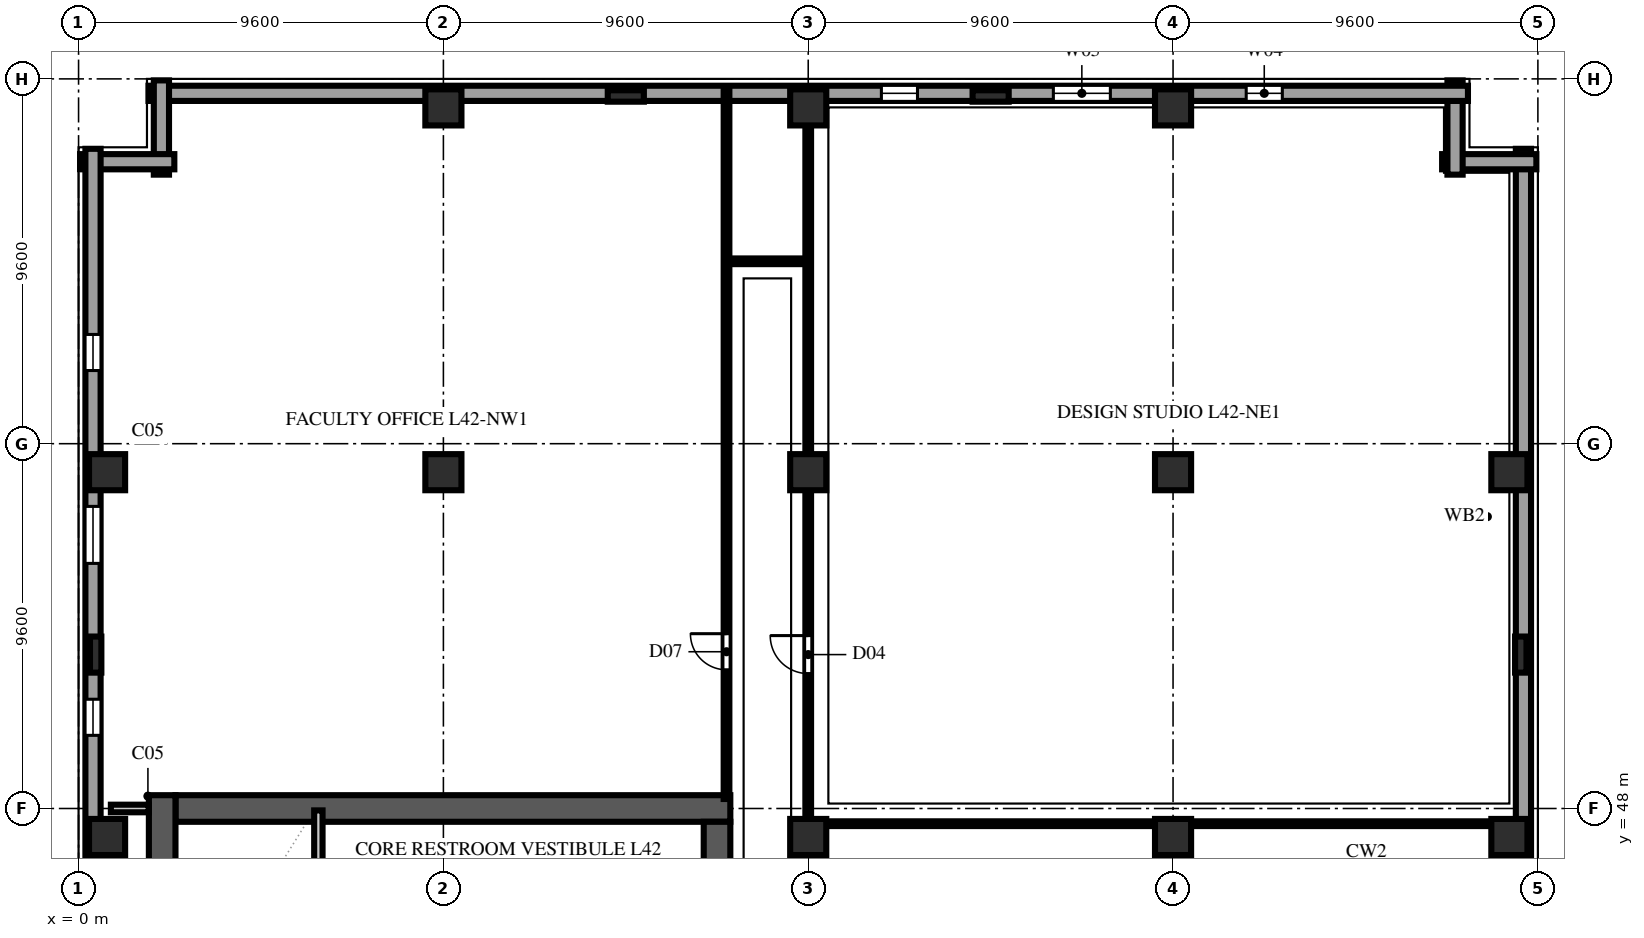
"""IFC4 building model, lengths in metres.
Left out: names, types, materials, properties, quantities, classifications, styles, units other than length and angle.
Written with IfcOpenShell. Run it as: python <this file> out.ifc"""

import sys

from ifc_helpers import new_model, si_unit, direction, frame, frame_2d, origin, origin_2d, place, context, subcontext, project, spatial, rectangle, extrude, element, fill, save


model = new_model("IFC4")
c1 = context("Model", 3, precision=1e-05, world=origin(), true_north=direction((0.0, 1.0)))
c2 = subcontext(c1, "Body", "Model", "MODEL_VIEW")
j1 = project(units=[si_unit("LENGTHUNIT", "METRE"), si_unit("PLANEANGLEUNIT", "RADIAN")], contexts=[c1])
p1 = place(None, origin())
s1 = spatial("IfcSite", under=j1, at=p1, CompositionType="ELEMENT")
p2 = place(p1, origin())
s2 = spatial("IfcBuilding", under=s1, at=p2, CompositionType="ELEMENT")
p3 = place(p2, frame((0.0, 0.0, 167.4)))
s3 = spatial("IfcBuildingStorey", under=s2, at=p3, CompositionType="ELEMENT", Elevation=167.4)
p4 = place(p3, frame((2.55, 48.0, 0.0), z_axis=(0.0, 0.0, 1.0), x_axis=(1.0, 0.0, 0.0)))
e1 = element("IfcWall", 1, at=p4, inside=s3, PredefinedType="SHEAR", context=c2, shape_type="SweptSolid", body=[
    extrude(rectangle(XDim=14.6, YDim=0.7, at=frame_2d((7.3, 0.0))), origin(), (0.0, 0.0, 1.0), 3.54),
])
p5 = place(p3, frame((2.2, 9.25, 0.0), z_axis=(0.0, 0.0, 1.0), x_axis=(0.0, 1.0, 0.0)))
e2 = element("IfcWall", 2, at=p5, inside=s3, PredefinedType="SHEAR", context=c2, shape_type="SweptSolid", body=[
    extrude(rectangle(XDim=39.1, YDim=0.7, at=frame_2d((19.55, 0.0))), origin(), (0.0, 0.0, 1.0), 3.54),
])
p6 = place(p3, frame((16.8, 36.4, 0.0), z_axis=(0.0, 0.0, 1.0), x_axis=(0.0, 1.0, 0.0)))
e3 = element("IfcWall", 3, at=p6, inside=s3, PredefinedType="SHEAR", context=c2, shape_type="SweptSolid", body=[
    extrude(rectangle(XDim=11.25, YDim=0.7, at=frame_2d((5.625, 0.0))), origin(), (0.0, 0.0, 1.0), 3.54),
])
p7 = place(p6, frame((9.2, 0.0, 0.0)))
e4 = element("IfcOpeningElement", 4, at=p7, cuts=e3, PredefinedType="OPENING", context=c2, shape_type="SweptSolid", body=[
    extrude(rectangle(XDim=0.95, YDim=2.15, at=frame_2d((0.475, 1.075))), frame((0.0, 0.362, 0.0), z_axis=(0.0, -1.0, 0.0), x_axis=(1.0, 0.0, 0.0)), (0.0, 0.0, 1.0), 0.724),
])
for number, where, z_axis, x_axis in (
    (5, (0.75, 47.25, 0.0), (0.0, 0.0, 1.0), (1.0, 0.0, 0.0)),
    (6, (0.75, 56.85, 0.0), (0.0, 0.0, 1.0), (1.0, 0.0, 0.0)),
    (7, (9.6, 56.85, 0.0), (0.0, 0.0, 1.0), (1.0, 0.0, 0.0)),
    (8, (9.6, 66.45, 0.0), (0.0, 0.0, 1.0), (1.0, 0.0, 0.0)),
    (9, (19.2, 47.25, 0.0), (0.0, 0.0, 1.0), (1.0, 0.0, 0.0)),
    (10, (19.2, 56.85, 0.0), (0.0, 0.0, 1.0), (1.0, 0.0, 0.0)),
    (11, (19.2, 66.45, 0.0), (0.0, 0.0, 1.0), (1.0, 0.0, 0.0)),
    (12, (28.8, 47.25, 0.0), (0.0, 0.0, 1.0), (1.0, 0.0, 0.0)),
    (13, (28.8, 56.85, 0.0), (0.0, 0.0, 1.0), (1.0, 0.0, 0.0)),
    (14, (28.8, 66.45, 0.0), (0.0, 0.0, 1.0), (1.0, 0.0, 0.0)),
    (15, (37.65, 47.25, 0.0), (0.0, 0.0, 1.0), (1.0, 0.0, 0.0)),
    (16, (37.65, 56.85, 0.0), (0.0, 0.0, 1.0), (1.0, 0.0, 0.0)),
):
    element("IfcColumn", number, at=place(p3, frame(where, z_axis=z_axis, x_axis=x_axis)), inside=s3, PredefinedType="COLUMN", context=c2, shape_type="SweptSolid", body=[
        extrude(rectangle(XDim=0.95, YDim=0.95, at=origin_2d()), origin(), (0.0, 0.0, 1.0), 3.8),
    ])
for number, where, z_axis, x_axis in (
    (17, (0.45, 52.05, 0.0), (0.0, 0.0, 1.0), (0.0, 1.0, 0.0)),
    (18, (14.4, 66.75, 0.0), (0.0, 0.0, 1.0), (1.0, 0.0, 0.0)),
    (19, (24.0, 66.75, 0.0), (0.0, 0.0, 1.0), (1.0, 0.0, 0.0)),
    (20, (37.95, 52.05, 0.0), (0.0, 0.0, 1.0), (0.0, 1.0, 0.0)),
):
    element("IfcColumn", number, at=place(p3, frame(where, z_axis=z_axis, x_axis=x_axis)), inside=s3, PredefinedType="PILASTER", context=c2, shape_type="SweptSolid", body=[
        extrude(rectangle(XDim=0.95, YDim=0.3, at=origin_2d()), origin(), (0.0, 0.0, 1.0), 3.8),
    ])
p8 = place(p3, frame((38.02, 46.0, 0.0), z_axis=(0.0, 0.0, 1.0), x_axis=(0.0, 1.0, 0.0)))
e21 = element("IfcWall", 21, at=p8, inside=s3, PredefinedType="SOLIDWALL", context=c2, shape_type="SweptSolid", body=[
    extrude(rectangle(XDim=19.36, YDim=0.4, at=frame_2d((9.68, 0.0))), origin(), (0.0, 0.0, 1.0), 3.54),
])
p9 = place(p3, frame((38.36, 65.02, 0.0), z_axis=(0.0, 0.0, 1.0), x_axis=(-1.0, 0.0, 0.0)))
e22 = element("IfcWall", 22, at=p9, inside=s3, PredefinedType="SOLIDWALL", context=c2, shape_type="SweptSolid", body=[
    extrude(rectangle(XDim=2.48, YDim=0.4, at=frame_2d((1.24, 0.0))), origin(), (0.0, 0.0, 1.0), 3.54),
])
p10 = place(p3, frame((36.22, 64.68, 0.0), z_axis=(0.0, 0.0, 1.0), x_axis=(0.0, 1.0, 0.0)))
e23 = element("IfcWall", 23, at=p10, inside=s3, PredefinedType="SOLIDWALL", context=c2, shape_type="SweptSolid", body=[
    extrude(rectangle(XDim=2.48, YDim=0.4, at=frame_2d((1.24, 0.0))), origin(), (0.0, 0.0, 1.0), 3.54),
])
p11 = place(p3, frame((36.56, 66.82, 0.0), z_axis=(0.0, 0.0, 1.0), x_axis=(-1.0, 0.0, 0.0)))
e24 = element("IfcWall", 24, at=p11, inside=s3, PredefinedType="SOLIDWALL", context=c2, shape_type="SweptSolid", body=[
    extrude(rectangle(XDim=34.72, YDim=0.4, at=frame_2d((17.36, 0.0))), origin(), (0.0, 0.0, 1.0), 3.54),
])
p12 = place(p11, frame((4.885, 0.0, 0.9)))
e25 = element("IfcOpeningElement", 25, at=p12, cuts=e24, PredefinedType="OPENING", context=c2, shape_type="SweptSolid", body=[
    extrude(rectangle(XDim=0.95, YDim=1.85, at=frame_2d((0.475, 0.925))), frame((0.0, 0.212, 0.0), z_axis=(0.0, -1.0, 0.0), x_axis=(1.0, 0.0, 0.0)), (0.0, 0.0, 1.0), 0.424),
])
p13 = place(p11, frame((9.41, 0.0, 0.9)))
e26 = element("IfcOpeningElement", 26, at=p13, cuts=e24, PredefinedType="OPENING", context=c2, shape_type="SweptSolid", body=[
    extrude(rectangle(XDim=1.5, YDim=1.85, at=frame_2d((0.75, 0.925))), frame((0.0, 0.212, 0.0), z_axis=(0.0, -1.0, 0.0), x_axis=(1.0, 0.0, 0.0)), (0.0, 0.0, 1.0), 0.424),
])
p14 = place(p11, frame((14.485, 0.0, 0.9)))
e27 = element("IfcOpeningElement", 27, at=p14, cuts=e24, PredefinedType="OPENING", context=c2, shape_type="SweptSolid", body=[
    extrude(rectangle(XDim=0.95, YDim=1.85, at=frame_2d((0.475, 0.925))), frame((0.0, 0.212, 0.0), z_axis=(0.0, -1.0, 0.0), x_axis=(1.0, 0.0, 0.0)), (0.0, 0.0, 1.0), 0.424),
])
for number, where, z_axis, x_axis in (
    (28, (2.18, 67.16, 0.0), (0.0, 0.0, 1.0), (0.0, -1.0, 0.0)),
    (29, (2.52, 65.02, 0.0), (0.0, 0.0, 1.0), (-1.0, 0.0, 0.0)),
):
    element("IfcWall", number, at=place(p3, frame(where, z_axis=z_axis, x_axis=x_axis)), inside=s3, PredefinedType="SOLIDWALL", context=c2, shape_type="SweptSolid", body=[
        extrude(rectangle(XDim=2.48, YDim=0.4, at=frame_2d((1.24, 0.0))), origin(), (0.0, 0.0, 1.0), 3.54),
    ])
p15 = place(p3, frame((0.38, 65.36, 0.0), z_axis=(0.0, 0.0, 1.0), x_axis=(0.0, -1.0, 0.0)))
e30 = element("IfcWall", 30, at=p15, inside=s3, PredefinedType="SOLIDWALL", context=c2, shape_type="SweptSolid", body=[
    extrude(rectangle(XDim=63.52, YDim=0.4, at=frame_2d((31.76, 0.0))), origin(), (0.0, 0.0, 1.0), 3.54),
])
p16 = place(p15, frame((4.885, 0.0, 0.9)))
e31 = element("IfcOpeningElement", 31, at=p16, cuts=e30, PredefinedType="OPENING", context=c2, shape_type="SweptSolid", body=[
    extrude(rectangle(XDim=0.95, YDim=1.85, at=frame_2d((0.475, 0.925))), frame((0.0, 0.212, 0.0), z_axis=(0.0, -1.0, 0.0), x_axis=(1.0, 0.0, 0.0)), (0.0, 0.0, 1.0), 0.424),
])
p17 = place(p15, frame((9.41, 0.0, 0.9)))
e32 = element("IfcOpeningElement", 32, at=p17, cuts=e30, PredefinedType="OPENING", context=c2, shape_type="SweptSolid", body=[
    extrude(rectangle(XDim=1.5, YDim=1.85, at=frame_2d((0.75, 0.925))), frame((0.0, 0.212, 0.0), z_axis=(0.0, -1.0, 0.0), x_axis=(1.0, 0.0, 0.0)), (0.0, 0.0, 1.0), 0.424),
])
p18 = place(p15, frame((14.485, 0.0, 0.9)))
e33 = element("IfcOpeningElement", 33, at=p18, cuts=e30, PredefinedType="OPENING", context=c2, shape_type="SweptSolid", body=[
    extrude(rectangle(XDim=0.95, YDim=1.85, at=frame_2d((0.475, 0.925))), frame((0.0, 0.212, 0.0), z_axis=(0.0, -1.0, 0.0), x_axis=(1.0, 0.0, 0.0)), (0.0, 0.0, 1.0), 0.424),
])
p19 = place(p15, frame((19.01, 0.0, 0.9)))
e34 = element("IfcOpeningElement", 34, at=p19, cuts=e30, PredefinedType="OPENING", context=c2, shape_type="SweptSolid", body=[
    extrude(rectangle(XDim=1.5, YDim=1.85, at=frame_2d((0.75, 0.925))), frame((0.0, 0.212, 0.0), z_axis=(0.0, -1.0, 0.0), x_axis=(1.0, 0.0, 0.0)), (0.0, 0.0, 1.0), 0.424),
])
p20 = place(p15, frame((24.085, 0.0, 0.9)))
e35 = element("IfcOpeningElement", 35, at=p20, cuts=e30, PredefinedType="OPENING", context=c2, shape_type="SweptSolid", body=[
    extrude(rectangle(XDim=0.95, YDim=1.85, at=frame_2d((0.475, 0.925))), frame((0.0, 0.212, 0.0), z_axis=(0.0, -1.0, 0.0), x_axis=(1.0, 0.0, 0.0)), (0.0, 0.0, 1.0), 0.424),
])
p21 = place(p15, frame((28.61, 0.0, 0.9)))
e36 = element("IfcOpeningElement", 36, at=p21, cuts=e30, PredefinedType="OPENING", context=c2, shape_type="SweptSolid", body=[
    extrude(rectangle(XDim=1.5, YDim=1.85, at=frame_2d((0.75, 0.925))), frame((0.0, 0.212, 0.0), z_axis=(0.0, -1.0, 0.0), x_axis=(1.0, 0.0, 0.0)), (0.0, 0.0, 1.0), 0.424),
])
p22 = place(p15, frame((33.685, 0.0, 0.9)))
e37 = element("IfcOpeningElement", 37, at=p22, cuts=e30, PredefinedType="OPENING", context=c2, shape_type="SweptSolid", body=[
    extrude(rectangle(XDim=0.95, YDim=1.85, at=frame_2d((0.475, 0.925))), frame((0.0, 0.212, 0.0), z_axis=(0.0, -1.0, 0.0), x_axis=(1.0, 0.0, 0.0)), (0.0, 0.0, 1.0), 0.424),
])
p23 = place(p15, frame((38.21, 0.0, 0.9)))
e38 = element("IfcOpeningElement", 38, at=p23, cuts=e30, PredefinedType="OPENING", context=c2, shape_type="SweptSolid", body=[
    extrude(rectangle(XDim=1.5, YDim=1.85, at=frame_2d((0.75, 0.925))), frame((0.0, 0.212, 0.0), z_axis=(0.0, -1.0, 0.0), x_axis=(1.0, 0.0, 0.0)), (0.0, 0.0, 1.0), 0.424),
])
p24 = place(p15, frame((43.285, 0.0, 0.9)))
e39 = element("IfcOpeningElement", 39, at=p24, cuts=e30, PredefinedType="OPENING", context=c2, shape_type="SweptSolid", body=[
    extrude(rectangle(XDim=0.95, YDim=1.85, at=frame_2d((0.475, 0.925))), frame((0.0, 0.212, 0.0), z_axis=(0.0, -1.0, 0.0), x_axis=(1.0, 0.0, 0.0)), (0.0, 0.0, 1.0), 0.424),
])
p25 = place(p15, frame((47.81, 0.0, 0.9)))
e40 = element("IfcOpeningElement", 40, at=p25, cuts=e30, PredefinedType="OPENING", context=c2, shape_type="SweptSolid", body=[
    extrude(rectangle(XDim=1.5, YDim=1.85, at=frame_2d((0.75, 0.925))), frame((0.0, 0.212, 0.0), z_axis=(0.0, -1.0, 0.0), x_axis=(1.0, 0.0, 0.0)), (0.0, 0.0, 1.0), 0.424),
])
p26 = place(p15, frame((52.885, 0.0, 0.9)))
e41 = element("IfcOpeningElement", 41, at=p26, cuts=e30, PredefinedType="OPENING", context=c2, shape_type="SweptSolid", body=[
    extrude(rectangle(XDim=0.95, YDim=1.85, at=frame_2d((0.475, 0.925))), frame((0.0, 0.212, 0.0), z_axis=(0.0, -1.0, 0.0), x_axis=(1.0, 0.0, 0.0)), (0.0, 0.0, 1.0), 0.424),
])
p27 = place(p15, frame((57.41, 0.0, 0.9)))
e42 = element("IfcOpeningElement", 42, at=p27, cuts=e30, PredefinedType="OPENING", context=c2, shape_type="SweptSolid", body=[
    extrude(rectangle(XDim=1.5, YDim=1.85, at=frame_2d((0.75, 0.925))), frame((0.0, 0.212, 0.0), z_axis=(0.0, -1.0, 0.0), x_axis=(1.0, 0.0, 0.0)), (0.0, 0.0, 1.0), 0.424),
])
p28 = place(p3, frame((6.31, 40.14, 0.0), z_axis=(0.0, 0.0, 1.0), x_axis=(0.0, 1.0, 0.0)))
e43 = element("IfcWall", 43, at=p28, inside=s3, PredefinedType="SOLIDWALL", context=c2, shape_type="SweptSolid", body=[
    extrude(rectangle(XDim=7.81, YDim=0.22, at=frame_2d((3.905, 0.0))), origin(), (0.0, 0.0, 1.0), 3.54),
])
p29 = place(p3, frame((0.85, 48.0, 0.0), z_axis=(0.0, 0.0, 1.0), x_axis=(1.0, 0.0, 0.0)))
e44 = element("IfcWall", 44, at=p29, inside=s3, PredefinedType="SOLIDWALL", context=c2, shape_type="SweptSolid", body=[
    extrude(rectangle(XDim=0.995, YDim=0.2, at=frame_2d((0.498, 0.0))), origin(), (0.0, 0.0, 1.0), 3.54),
])
p30 = place(p3, frame((17.05, 62.4, 0.0), z_axis=(0.0, 0.0, 1.0), x_axis=(1.0, 0.0, 0.0)))
e45 = element("IfcWall", 45, at=p30, inside=s3, PredefinedType="PARTITIONING", context=c2, shape_type="SweptSolid", body=[
    extrude(rectangle(XDim=2.15, YDim=0.15, at=frame_2d((1.075, 0.0))), origin(), (0.0, 0.0, 1.0), 3.54),
])
p31 = place(p3, frame((19.2, 38.18, 0.0), z_axis=(0.0, 0.0, 1.0), x_axis=(0.0, 1.0, 0.0)))
e46 = element("IfcWall", 46, at=p31, inside=s3, PredefinedType="PARTITIONING", context=c2, shape_type="SweptSolid", body=[
    extrude(rectangle(XDim=9.07, YDim=0.15, at=frame_2d((4.535, 0.0))), origin(), (0.0, 0.0, 1.0), 2.845),
])
p32 = place(p31, frame((3.85, 0.0, 0.0)))
e47 = element("IfcOpeningElement", 47, at=p32, cuts=e46, PredefinedType="OPENING", context=c2, shape_type="SweptSolid", body=[
    extrude(rectangle(XDim=0.95, YDim=2.15, at=frame_2d((0.475, 1.075))), frame((0.0, 0.087, 0.0), z_axis=(0.0, -1.0, 0.0), x_axis=(1.0, 0.0, 0.0)), (0.0, 0.0, 1.0), 0.174),
])
p33 = place(p3, frame((19.2, 47.25, 0.0), z_axis=(0.0, 0.0, 1.0), x_axis=(0.0, 1.0, 0.0)))
e48 = element("IfcWall", 48, at=p33, inside=s3, PredefinedType="PARTITIONING", context=c2, shape_type="SweptSolid", body=[
    extrude(rectangle(XDim=0.35, YDim=0.15, at=frame_2d((0.175, 0.0))), origin(), (0.0, 0.0, 1.0), 3.54),
])
p34 = place(p3, frame((19.2, 47.6, 0.0), z_axis=(0.0, 0.0, 1.0), x_axis=(1.0, 0.0, 0.0)))
e49 = element("IfcWall", 49, at=p34, inside=s3, PredefinedType="PARTITIONING", context=c2, shape_type="SweptSolid", body=[
    extrude(rectangle(XDim=18.98, YDim=0.125, at=frame_2d((9.49, 0.0))), origin(), (0.0, 0.0, 1.0), 3.54),
])
p35 = place(p3, frame((19.2, 47.6, 0.0), z_axis=(0.0, 0.0, 1.0), x_axis=(0.0, 1.0, 0.0)))
e50 = element("IfcWall", 50, at=p35, inside=s3, PredefinedType="PARTITIONING", context=c2, shape_type="SweptSolid", body=[
    extrude(rectangle(XDim=18.85, YDim=0.15, at=frame_2d((9.425, 0.0))), origin(), (0.0, 0.0, 1.0), 2.845),
])
p36 = place(p35, frame((3.95, 0.0, 0.0)))
e51 = element("IfcOpeningElement", 51, at=p36, cuts=e50, PredefinedType="OPENING", context=c2, shape_type="SweptSolid", body=[
    extrude(rectangle(XDim=1.0, YDim=2.2, at=frame_2d((0.5, 1.1))), frame((0.0, 0.087, 0.0), z_axis=(0.0, -1.0, 0.0), x_axis=(1.0, 0.0, 0.0)), (0.0, 0.0, 1.0), 0.174),
])
p37 = place(p3, frame((19.2, 66.45, 0.0), z_axis=(0.0, 0.0, 1.0), x_axis=(0.0, 1.0, 0.0)))
e52 = element("IfcWall", 52, at=p37, inside=s3, PredefinedType="PARTITIONING", context=c2, shape_type="SweptSolid", body=[
    extrude(rectangle(XDim=0.53, YDim=0.15, at=frame_2d((0.265, 0.0))), origin(), (0.0, 0.0, 1.0), 3.54),
])
p38 = place(p3, frame((17.05, 48.25, 0.0), z_axis=(0.0, 0.0, 1.0), x_axis=(0.0, 1.0, 0.0)))
e53 = element("IfcWall", 53, at=p38, inside=s3, PredefinedType="PARTITIONING", context=c2, shape_type="SweptSolid", body=[
    extrude(rectangle(XDim=18.73, YDim=0.15, at=frame_2d((9.365, 0.0))), origin(), (0.0, 0.0, 1.0), 3.54),
])
p39 = place(p38, frame((3.4, 0.0, 0.0)))
e54 = element("IfcOpeningElement", 54, at=p39, cuts=e53, PredefinedType="OPENING", context=c2, shape_type="SweptSolid", body=[
    extrude(rectangle(XDim=0.95, YDim=2.15, at=frame_2d((0.475, 1.075))), frame((0.0, 0.087, 0.0), z_axis=(0.0, -1.0, 0.0), x_axis=(1.0, 0.0, 0.0)), (0.0, 0.0, 1.0), 0.174),
])
p40 = place(p12, origin())
e55 = element("IfcWindow", 55, at=p40, inside=s3, PartitioningType="SINGLE_PANEL", PredefinedType="WINDOW", context=c2, shape_type="SweptSolid", body=[
    extrude(rectangle(XDim=0.95, YDim=1.85, at=frame_2d((0.475, 0.925))), frame((0.0, 0.11, 0.0), z_axis=(0.0, -1.0, 0.0), x_axis=(1.0, 0.0, 0.0)), (0.0, 0.0, 1.0), 0.06),
])
fill(e25, e55)
p41 = place(p13, origin())
e56 = element("IfcWindow", 56, at=p41, inside=s3, PartitioningType="DOUBLE_PANEL_VERTICAL", PredefinedType="WINDOW", context=c2, shape_type="SweptSolid", body=[
    extrude(rectangle(XDim=1.5, YDim=1.85, at=frame_2d((0.75, 0.925))), frame((0.0, 0.11, 0.0), z_axis=(0.0, -1.0, 0.0), x_axis=(1.0, 0.0, 0.0)), (0.0, 0.0, 1.0), 0.06),
])
fill(e26, e56)
p42 = place(p14, origin())
e57 = element("IfcWindow", 57, at=p42, inside=s3, PartitioningType="SINGLE_PANEL", PredefinedType="WINDOW", context=c2, shape_type="SweptSolid", body=[
    extrude(rectangle(XDim=0.95, YDim=1.85, at=frame_2d((0.475, 0.925))), frame((0.0, 0.11, 0.0), z_axis=(0.0, -1.0, 0.0), x_axis=(1.0, 0.0, 0.0)), (0.0, 0.0, 1.0), 0.06),
])
fill(e27, e57)
p43 = place(p16, origin())
e58 = element("IfcWindow", 58, at=p43, inside=s3, PartitioningType="SINGLE_PANEL", PredefinedType="WINDOW", context=c2, shape_type="SweptSolid", body=[
    extrude(rectangle(XDim=0.95, YDim=1.85, at=frame_2d((0.475, 0.925))), frame((0.0, 0.11, 0.0), z_axis=(0.0, -1.0, 0.0), x_axis=(1.0, 0.0, 0.0)), (0.0, 0.0, 1.0), 0.06),
])
fill(e31, e58)
p44 = place(p17, origin())
e59 = element("IfcWindow", 59, at=p44, inside=s3, PartitioningType="DOUBLE_PANEL_VERTICAL", PredefinedType="WINDOW", context=c2, shape_type="SweptSolid", body=[
    extrude(rectangle(XDim=1.5, YDim=1.85, at=frame_2d((0.75, 0.925))), frame((0.0, 0.11, 0.0), z_axis=(0.0, -1.0, 0.0), x_axis=(1.0, 0.0, 0.0)), (0.0, 0.0, 1.0), 0.06),
])
fill(e32, e59)
p45 = place(p18, origin())
e60 = element("IfcWindow", 60, at=p45, inside=s3, PartitioningType="SINGLE_PANEL", PredefinedType="WINDOW", context=c2, shape_type="SweptSolid", body=[
    extrude(rectangle(XDim=0.95, YDim=1.85, at=frame_2d((0.475, 0.925))), frame((0.0, 0.11, 0.0), z_axis=(0.0, -1.0, 0.0), x_axis=(1.0, 0.0, 0.0)), (0.0, 0.0, 1.0), 0.06),
])
fill(e33, e60)
p46 = place(p36, origin())
e61 = element("IfcDoor", 61, at=p46, inside=s3, OperationType="SINGLE_SWING_RIGHT", PredefinedType="DOOR", context=c2, shape_type="SweptSolid", body=[
    extrude(rectangle(XDim=1.0, YDim=2.2, at=frame_2d((0.5, 1.1))), frame((0.0, 0.025, 0.0), z_axis=(0.0, -1.0, 0.0), x_axis=(1.0, 0.0, 0.0)), (0.0, 0.0, 1.0), 0.05),
])
fill(e51, e61)
p47 = place(p39, origin())
e62 = element("IfcDoor", 62, at=p47, inside=s3, OperationType="SINGLE_SWING_RIGHT", PredefinedType="DOOR", context=c2, shape_type="SweptSolid", body=[
    extrude(rectangle(XDim=0.95, YDim=2.15, at=frame_2d((0.475, 1.075))), frame((0.0, 0.025, 0.0), z_axis=(0.0, -1.0, 0.0), x_axis=(1.0, 0.0, 0.0)), (0.0, 0.0, 1.0), 0.05),
])
fill(e54, e62)
save(model, sys.argv[1])
